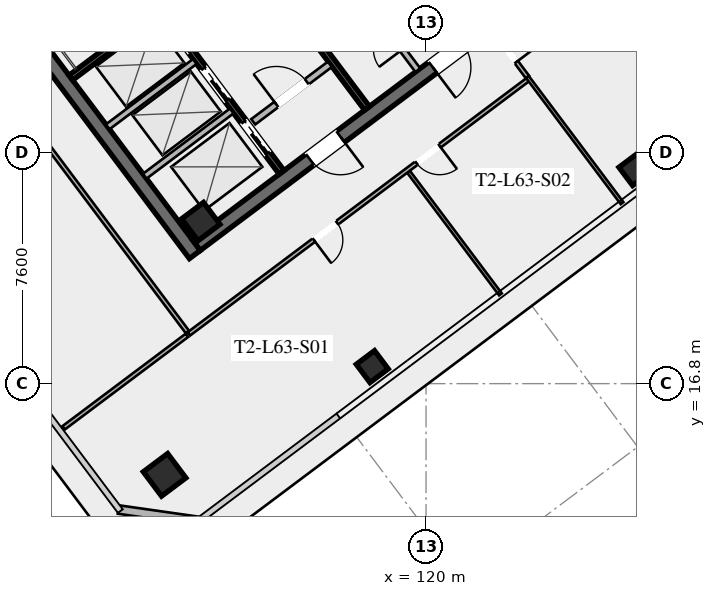
"""IFC4 building model, lengths in metres.
Left out: names, types, materials, properties, quantities, classifications, styles, units other than length and angle.
Written with IfcOpenShell. Run it as: python <this file> out.ifc"""

import sys

from ifc_helpers import new_model, si_unit, direction, frame, frame_2d, origin, origin_2d, place, context, subcontext, project, spatial, rectangle, hollow_rectangle, extrude, element, fill, save


model = new_model("IFC4")
c1 = context("Model", 3, precision=1e-05, world=origin(), true_north=direction((0.0, 1.0)))
c2 = subcontext(c1, "Body", "Model", "MODEL_VIEW")
j1 = project(units=[si_unit("LENGTHUNIT", "METRE"), si_unit("PLANEANGLEUNIT", "RADIAN")], contexts=[c1])
p1 = place(None, origin())
s1 = spatial("IfcSite", under=j1, at=p1, CompositionType="ELEMENT")
p2 = place(p1, origin())
s2 = spatial("IfcBuilding", under=s1, at=p2, CompositionType="ELEMENT")
p3 = place(p2, frame((0.0, 0.0, 232.6)))
s3 = spatial("IfcBuildingStorey", under=s2, at=p3, CompositionType="ELEMENT", Elevation=232.6)
p4 = place(p3, frame((112.396, 21.047, 0.0), z_axis=(0.0, 0.0, 1.0), x_axis=(-0.600005007985, 0.799996243986, 0.0)))
e1 = element("IfcWall", 1, at=p4, inside=s3, PredefinedType="SHEAR", context=c2, shape_type="SweptSolid", body=[
    extrude(rectangle(XDim=15.6, YDim=0.45, at=frame_2d((7.8, 0.0))), origin(), (0.0, 0.0, 1.0), 3.55),
])
p5 = place(p3, frame((124.649, 30.518, 0.0), z_axis=(0.0, 0.0, 1.0), x_axis=(-0.8, -0.6, 0.0)))
e2 = element("IfcWall", 2, at=p5, inside=s3, PredefinedType="SHEAR", context=c2, shape_type="SweptSolid", body=[
    extrude(rectangle(XDim=15.26, YDim=0.45, at=frame_2d((7.63, 0.0))), origin(), (0.0, 0.0, 1.0), 3.55),
])
p6 = place(p5, frame((9.33, 0.0, 0.0)))
e3 = element("IfcOpeningElement", 3, at=p6, cuts=e2, PredefinedType="OPENING", context=c2, shape_type="SweptSolid", body=[
    extrude(rectangle(XDim=1.25, YDim=2.25, at=frame_2d((0.625, 1.125))), frame((0.0, 0.235, 0.0), z_axis=(0.0, -1.0, 0.0), x_axis=(1.0, 0.0, 0.0)), (0.0, 0.0, 1.0), 0.47),
])
p7 = place(p5, frame((4.28, 0.0, 0.0)))
e4 = element("IfcOpeningElement", 4, at=p7, cuts=e2, PredefinedType="OPENING", context=c2, shape_type="SweptSolid", body=[
    extrude(rectangle(XDim=1.25, YDim=2.25, at=frame_2d((0.625, 1.125))), frame((0.0, 0.235, 0.0), z_axis=(0.0, -1.0, 0.0), x_axis=(1.0, 0.0, 0.0)), (0.0, 0.0, 1.0), 0.47),
])
p8 = place(p3, frame((112.59, 22.13, 0.0), z_axis=(0.0, 0.0, 1.0), x_axis=(0.799999996291, 0.600000004945, 0.0)))
e5 = element("IfcColumn", 5, at=p8, inside=s3, PredefinedType="COLUMN", context=c2, shape_type="SweptSolid", body=[
    extrude(hollow_rectangle(XDim=0.9, YDim=0.9, WallThickness=0.04, at=origin_2d()), origin(), (0.0, 0.0, 1.0), 3.37),
])
p9 = place(p3, frame((111.4, 13.8, -0.175), z_axis=(0.0, 0.0, 1.0), x_axis=(0.799999996291, 0.600000004945, 0.0)))
e6 = element("IfcColumn", 6, at=p9, inside=s3, PredefinedType="COLUMN", context=c2, shape_type="SweptSolid", body=[
    extrude(hollow_rectangle(XDim=1.0, YDim=1.0, WallThickness=0.04, at=origin_2d()), origin(), (0.0, 0.0, 1.0), 3.545),
])
for number, where, z_axis, x_axis in (
    (7, (118.23, 17.36, -0.175), (0.0, 0.0, 1.0), (0.8, 0.6, 0.0)),
    (8, (126.87, 23.84, -0.175), (0.0, 0.0, 1.0), (0.8, 0.6, 0.0)),
):
    element("IfcColumn", number, at=place(p3, frame(where, z_axis=z_axis, x_axis=x_axis)), inside=s3, PredefinedType="COLUMN", context=c2, shape_type="SweptSolid", body=[
        extrude(hollow_rectangle(XDim=0.75, YDim=0.75, WallThickness=0.032, at=origin_2d()), origin(), (0.0, 0.0, 1.0), 3.545),
    ])
p10 = place(p3, frame((112.54, 12.28, 0.0), z_axis=(0.0, 0.0, 1.0), x_axis=(-0.989956760759, 0.141370477216, 0.0)))
e9 = element("IfcWall", 9, at=p10, inside=s3, PredefinedType="SOLIDWALL", context=c2, shape_type="SweptSolid", body=[
    extrude(rectangle(XDim=2.687, YDim=0.28, at=frame_2d((1.344, 0.0))), origin(), (0.0, 0.0, 1.0), 3.37),
])
p11 = place(p3, frame((108.316, 26.862, 0.0), z_axis=(0.0, 0.0, 1.0), x_axis=(0.800014909178, 0.599980120581, 0.0)))
e10 = element("IfcWall", 10, at=p11, inside=s3, PredefinedType="SHEAR", context=c2, shape_type="SweptSolid", body=[
    extrude(rectangle(XDim=3.93, YDim=0.2, at=frame_2d((1.965, 0.0))), origin(), (0.0, 0.0, 1.0), 3.37),
])
p12 = place(p3, frame((118.058, 25.856, 0.0), z_axis=(0.0, 0.0, 1.0), x_axis=(-0.600002657301, 0.799998007018, 0.0)))
e11 = element("IfcWall", 11, at=p12, inside=s3, PredefinedType="SHEAR", context=c2, shape_type="SweptSolid", body=[
    extrude(rectangle(XDim=14.7, YDim=0.2, at=frame_2d((7.35, 0.0))), origin(), (0.0, 0.0, 1.0), 3.37),
])
p13 = place(p3, frame((114.316, 25.412, 0.0), z_axis=(0.0, 0.0, 1.0), x_axis=(0.800018601094, 0.59997519774, 0.0)))
e12 = element("IfcWall", 12, at=p13, inside=s3, PredefinedType="SOLIDWALL", context=c2, shape_type="SweptSolid", body=[
    extrude(rectangle(XDim=3.15, YDim=0.22, at=frame_2d((1.575, 0.0))), origin(), (0.0, 0.0, 1.0), 2.723),
])
p14 = place(p13, frame((0.95, 0.0, 0.0)))
e13 = element("IfcOpeningElement", 13, at=p14, cuts=e12, PredefinedType="OPENING", context=c2, shape_type="SweptSolid", body=[
    extrude(rectangle(XDim=1.25, YDim=2.25, at=frame_2d((0.625, 1.125))), frame((0.0, 0.12, 0.0), z_axis=(0.0, -1.0, 0.0), x_axis=(1.0, 0.0, 0.0)), (0.0, 0.0, 1.0), 0.24),
])
p15 = place(p3, frame((115.25, 23.75, 0.0), z_axis=(0.0, 0.0, 1.0), x_axis=(-0.599994036198, 0.800004472816, 0.0)))
e14 = element("IfcWall", 14, at=p15, inside=s3, PredefinedType="SHEAR", context=c2, shape_type="SweptSolid", body=[
    extrude(rectangle(XDim=6.55, YDim=0.2, at=frame_2d((3.275, 0.0))), origin(), (0.0, 0.0, 1.0), 3.37),
])
p16 = place(p15, frame((4.975, 0.0, 0.0)))
e15 = element("IfcOpeningElement", 15, at=p16, cuts=e14, PredefinedType="OPENING", context=c2, shape_type="SweptSolid", body=[
    extrude(rectangle(XDim=1.3, YDim=2.25, at=frame_2d((0.65, 1.125))), frame((0.0, 0.11, 0.0), z_axis=(0.0, -1.0, 0.0), x_axis=(1.0, 0.0, 0.0)), (0.0, 0.0, 1.0), 0.22),
])
p17 = place(p15, frame((2.975, 0.0, 0.0)))
e16 = element("IfcOpeningElement", 16, at=p17, cuts=e14, PredefinedType="OPENING", context=c2, shape_type="SweptSolid", body=[
    extrude(rectangle(XDim=1.3, YDim=2.25, at=frame_2d((0.65, 1.125))), frame((0.0, 0.11, 0.0), z_axis=(0.0, -1.0, 0.0), x_axis=(1.0, 0.0, 0.0)), (0.0, 0.0, 1.0), 0.22),
])
p18 = place(p15, frame((0.775, 0.0, 0.0)))
e17 = element("IfcOpeningElement", 17, at=p18, cuts=e14, PredefinedType="OPENING", context=c2, shape_type="SweptSolid", body=[
    extrude(rectangle(XDim=1.3, YDim=2.25, at=frame_2d((0.65, 1.125))), frame((0.0, 0.11, 0.0), z_axis=(0.0, -1.0, 0.0), x_axis=(1.0, 0.0, 0.0)), (0.0, 0.0, 1.0), 0.22),
])
for number, where, z_axis, x_axis in (
    (18, (110.746, 23.622, 0.0), (0.0, 0.0, 1.0), (0.8, 0.6, 0.0)),
    (19, (109.528, 25.246, 0.0), (0.0, 0.0, 1.0), (0.8, 0.6, 0.0)),
):
    element("IfcWall", number, at=place(p3, frame(where, z_axis=z_axis, x_axis=x_axis)), inside=s3, PredefinedType="SOLIDWALL", context=c2, shape_type="SweptSolid", body=[
        extrude(rectangle(XDim=3.58, YDim=0.2, at=frame_2d((1.79, 0.0))), origin(), (0.0, 0.0, 1.0), 3.37),
    ])
p19 = place(p3, frame((119.73, 27.11, 0.0), z_axis=(0.0, 0.0, 1.0), x_axis=(-0.600005580459, 0.799995814625, 0.0)))
e20 = element("IfcWall", 20, at=p19, inside=s3, PredefinedType="SOLIDWALL", context=c2, shape_type="SweptSolid", body=[
    extrude(rectangle(XDim=7.0, YDim=0.2, at=frame_2d((3.5, 0.0))), origin(), (0.0, 0.0, 1.0), 2.723),
])
p20 = place(p19, frame((0.85, 0.0, 0.0)))
e21 = element("IfcOpeningElement", 21, at=p20, cuts=e20, PredefinedType="OPENING", context=c2, shape_type="SweptSolid", body=[
    extrude(rectangle(XDim=0.95, YDim=2.05, at=frame_2d((0.475, 1.025))), frame((0.0, 0.11, 0.0), z_axis=(0.0, -1.0, 0.0), x_axis=(1.0, 0.0, 0.0)), (0.0, 0.0, 1.0), 0.22),
])
p21 = place(p19, frame((4.8, 0.0, 0.0)))
e22 = element("IfcOpeningElement", 22, at=p21, cuts=e20, PredefinedType="OPENING", context=c2, shape_type="SweptSolid", body=[
    extrude(rectangle(XDim=1.05, YDim=2.2, at=frame_2d((0.525, 1.1))), frame((0.0, 0.11, 0.0), z_axis=(0.0, -1.0, 0.0), x_axis=(1.0, 0.0, 0.0)), (0.0, 0.0, 1.0), 0.22),
])
p22 = place(p3, frame((123.382, 26.824, 0.0), z_axis=(0.0, 0.0, 1.0), x_axis=(-0.800004191227, -0.599994411657, 0.0)))
e23 = element("IfcWall", 23, at=p22, inside=s3, PredefinedType="PARTITIONING", context=c2, shape_type="SweptSolid", body=[
    extrude(rectangle(XDim=13.98, YDim=0.135, at=frame_2d((6.99, 0.0))), origin(), (0.0, 0.0, 1.0), 2.723),
])
p23 = place(p22, frame((7.887, 0.0, 0.0)))
e24 = element("IfcOpeningElement", 24, at=p23, cuts=e23, PredefinedType="OPENING", context=c2, shape_type="SweptSolid", body=[
    extrude(rectangle(XDim=0.95, YDim=2.05, at=frame_2d((0.475, 1.025))), frame((0.0, 0.077, 0.0), z_axis=(0.0, -1.0, 0.0), x_axis=(1.0, 0.0, 0.0)), (0.0, 0.0, 1.0), 0.155),
])
p24 = place(p22, frame((3.67, 0.0, 0.0)))
e25 = element("IfcOpeningElement", 25, at=p24, cuts=e23, PredefinedType="OPENING", context=c2, shape_type="SweptSolid", body=[
    extrude(rectangle(XDim=0.95, YDim=2.05, at=frame_2d((0.475, 1.025))), frame((0.0, 0.077, 0.0), z_axis=(0.0, -1.0, 0.0), x_axis=(1.0, 0.0, 0.0)), (0.0, 0.0, 1.0), 0.155),
])
p25 = place(p3, frame((122.248, 28.336, 0.0), z_axis=(0.0, 0.0, 1.0), x_axis=(0.599978417824, -0.800016186177, 0.0)))
e26 = element("IfcWall", 26, at=p25, inside=s3, PredefinedType="PARTITIONING", context=c2, shape_type="SweptSolid", body=[
    extrude(rectangle(XDim=1.81, YDim=0.135, at=frame_2d((0.905, 0.0))), origin(), (0.0, 0.0, 1.0), 2.723),
])
p26 = place(p25, frame((0.25, 0.0, 0.0)))
e27 = element("IfcOpeningElement", 27, at=p26, cuts=e26, PredefinedType="OPENING", context=c2, shape_type="SweptSolid", body=[
    extrude(rectangle(XDim=0.95, YDim=2.05, at=frame_2d((0.475, 1.025))), frame((0.0, 0.077, 0.0), z_axis=(0.0, -1.0, 0.0), x_axis=(1.0, 0.0, 0.0)), (0.0, 0.0, 1.0), 0.155),
])
p27 = place(p3, frame((122.448, 19.736, 0.0), z_axis=(0.0, 0.0, 1.0), x_axis=(-0.600015531756, 0.799988350947, 0.0)))
e28 = element("IfcWall", 28, at=p27, inside=s3, PredefinedType="PARTITIONING", context=c2, shape_type="SweptSolid", body=[
    extrude(rectangle(XDim=5.03, YDim=0.11, at=frame_2d((2.515, 0.0))), origin(), (0.0, 0.0, 1.0), 2.723),
])
p28 = place(p3, frame((126.448, 22.736, 0.0), z_axis=(0.0, 0.0, 1.0), x_axis=(-0.600015053192, 0.799988709885, 0.0)))
e29 = element("IfcWall", 29, at=p28, inside=s3, PredefinedType="PARTITIONING", context=c2, shape_type="SweptSolid", body=[
    extrude(rectangle(XDim=5.19, YDim=0.11, at=frame_2d((2.595, 0.0))), origin(), (0.0, 0.0, 1.0), 2.723),
])
p29 = place(p3, frame((112.15, 18.5, 0.0), z_axis=(0.0, 0.0, 1.0), x_axis=(-0.599998104681, 0.800001421485, 0.0)))
e30 = element("IfcWall", 30, at=p29, inside=s3, PredefinedType="PARTITIONING", context=c2, shape_type="SweptSolid", body=[
    extrude(rectangle(XDim=20.61, YDim=0.135, at=frame_2d((10.305, 0.0))), origin(), (0.0, 0.0, 1.0), 2.723),
])
p30 = place(p29, frame((19.36, 0.0, 0.0)))
e31 = element("IfcOpeningElement", 31, at=p30, cuts=e30, PredefinedType="OPENING", context=c2, shape_type="SweptSolid", body=[
    extrude(rectangle(XDim=0.95, YDim=2.05, at=frame_2d((0.475, 1.025))), frame((0.0, 0.077, 0.0), z_axis=(0.0, -1.0, 0.0), x_axis=(1.0, 0.0, 0.0)), (0.0, 0.0, 1.0), 0.155),
])
p31 = place(p3, frame((108.078, 15.346, 0.0), z_axis=(0.0, 0.0, 1.0), x_axis=(0.800011556537, 0.599984590975, 0.0)))
e32 = element("IfcWall", 32, at=p31, inside=s3, PredefinedType="PARTITIONING", context=c2, shape_type="SweptSolid", body=[
    extrude(rectangle(XDim=5.07, YDim=0.135, at=frame_2d((2.535, 0.0))), origin(), (0.0, 0.0, 1.0), 2.723),
])
p32 = place(p6, origin())
e33 = element("IfcDoor", 33, at=p32, inside=s3, OperationType="SINGLE_SWING_LEFT", PredefinedType="DOOR", context=c2, shape_type="SweptSolid", body=[
    extrude(rectangle(XDim=1.25, YDim=2.25, at=frame_2d((0.625, 1.125))), frame((0.0, 0.025, 0.0), z_axis=(0.0, -1.0, 0.0), x_axis=(1.0, 0.0, 0.0)), (0.0, 0.0, 1.0), 0.05),
])
fill(e3, e33)
p33 = place(p7, origin())
e34 = element("IfcDoor", 34, at=p33, inside=s3, OperationType="SINGLE_SWING_RIGHT", PredefinedType="DOOR", context=c2, shape_type="SweptSolid", body=[
    extrude(rectangle(XDim=1.25, YDim=2.25, at=frame_2d((0.625, 1.125))), frame((0.0, 0.025, 0.0), z_axis=(0.0, -1.0, 0.0), x_axis=(1.0, 0.0, 0.0)), (0.0, 0.0, 1.0), 0.05),
])
fill(e4, e34)
p34 = place(p14, origin())
e35 = element("IfcDoor", 35, at=p34, inside=s3, OperationType="SINGLE_SWING_LEFT", PredefinedType="DOOR", context=c2, shape_type="SweptSolid", body=[
    extrude(rectangle(XDim=1.25, YDim=2.25, at=frame_2d((0.625, 1.125))), frame((0.0, 0.025, 0.0), z_axis=(0.0, -1.0, 0.0), x_axis=(1.0, 0.0, 0.0)), (0.0, 0.0, 1.0), 0.05),
])
fill(e13, e35)
p35 = place(p23, origin())
e36 = element("IfcDoor", 36, at=p35, inside=s3, OperationType="SINGLE_SWING_RIGHT", PredefinedType="DOOR", context=c2, shape_type="SweptSolid", body=[
    extrude(rectangle(XDim=0.95, YDim=2.05, at=frame_2d((0.475, 1.025))), frame((0.0, 0.025, 0.0), z_axis=(0.0, -1.0, 0.0), x_axis=(1.0, 0.0, 0.0)), (0.0, 0.0, 1.0), 0.05),
])
fill(e24, e36)
p36 = place(p24, origin())
e37 = element("IfcDoor", 37, at=p36, inside=s3, OperationType="SINGLE_SWING_LEFT", PredefinedType="DOOR", context=c2, shape_type="SweptSolid", body=[
    extrude(rectangle(XDim=0.95, YDim=2.05, at=frame_2d((0.475, 1.025))), frame((0.0, 0.025, 0.0), z_axis=(0.0, -1.0, 0.0), x_axis=(1.0, 0.0, 0.0)), (0.0, 0.0, 1.0), 0.05),
])
fill(e25, e37)
p37 = place(p26, origin())
e38 = element("IfcDoor", 38, at=p37, inside=s3, OperationType="SINGLE_SWING_RIGHT", PredefinedType="DOOR", context=c2, shape_type="SweptSolid", body=[
    extrude(rectangle(XDim=0.95, YDim=2.05, at=frame_2d((0.475, 1.025))), frame((0.0, 0.025, 0.0), z_axis=(0.0, -1.0, 0.0), x_axis=(1.0, 0.0, 0.0)), (0.0, 0.0, 1.0), 0.05),
])
fill(e27, e38)
p38 = place(p17, origin())
e39 = element("IfcDoor", 39, at=p38, inside=s3, OperationType="SLIDING_TO_LEFT", PredefinedType="DOOR", context=c2, shape_type="SweptSolid", body=[
    extrude(rectangle(XDim=1.3, YDim=2.25, at=frame_2d((0.65, 1.125))), frame((0.0, 0.025, 0.0), z_axis=(0.0, -1.0, 0.0), x_axis=(1.0, 0.0, 0.0)), (0.0, 0.0, 1.0), 0.05),
])
fill(e16, e39)
p39 = place(p18, origin())
e40 = element("IfcDoor", 40, at=p39, inside=s3, OperationType="SLIDING_TO_LEFT", PredefinedType="DOOR", context=c2, shape_type="SweptSolid", body=[
    extrude(rectangle(XDim=1.3, YDim=2.25, at=frame_2d((0.65, 1.125))), frame((0.0, 0.025, 0.0), z_axis=(0.0, -1.0, 0.0), x_axis=(1.0, 0.0, 0.0)), (0.0, 0.0, 1.0), 0.05),
])
fill(e17, e40)
save(model, sys.argv[1])
